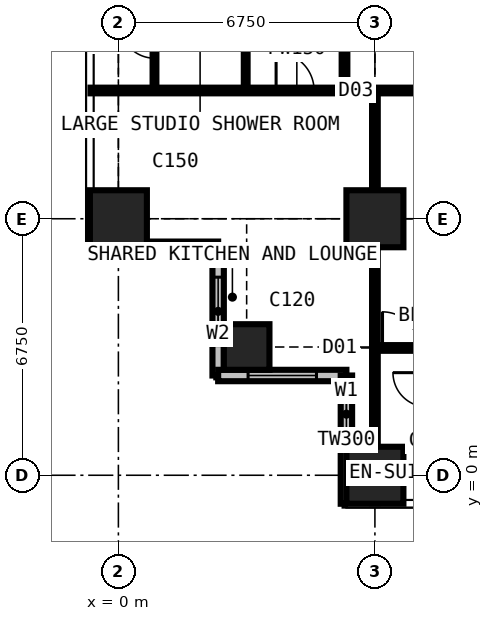
"""IFC4 building model, lengths in metres.
Left out: names, types, materials, properties, quantities, classifications, styles, units other than length and angle.
Written with IfcOpenShell. Run it as: python <this file> out.ifc"""

import sys

from ifc_helpers import new_model, si_unit, direction, frame, frame_2d, origin, origin_2d, place, context, subcontext, project, spatial, rectangle, extrude, element, fill, save


model = new_model("IFC4")
c1 = context("Model", 3, precision=1e-05, world=origin(), true_north=direction((0.0, 1.0)))
c2 = subcontext(c1, "Body", "Model", "MODEL_VIEW")
j1 = project(units=[si_unit("LENGTHUNIT", "METRE"), si_unit("PLANEANGLEUNIT", "RADIAN")], contexts=[c1])
p1 = place(None, origin())
s1 = spatial("IfcSite", under=j1, at=p1, CompositionType="ELEMENT")
p2 = place(p1, origin())
s2 = spatial("IfcBuilding", under=s1, at=p2, CompositionType="ELEMENT")
p3 = place(p2, frame((0.0, 0.0, 153.0)))
s3 = spatial("IfcBuildingStorey", under=s2, at=p3, CompositionType="ELEMENT", Elevation=153.0)
p4 = place(p3, frame((0.0, 6.75, 0.0), z_axis=(0.0, 0.0, 1.0), x_axis=(1.0, 0.0, 0.0)))
e1 = element("IfcColumn", 1, at=p4, inside=s3, PredefinedType="COLUMN", context=c2, shape_type="SweptSolid", body=[
    extrude(rectangle(XDim=1.5, YDim=1.5, at=origin_2d()), origin(), (0.0, 0.0, 1.0), 3.6),
])
p5 = place(p3, frame((3.375, 3.375, 0.0), z_axis=(0.0, 0.0, 1.0), x_axis=(1.0, 0.0, 0.0)))
e2 = element("IfcColumn", 2, at=p5, inside=s3, PredefinedType="COLUMN", context=c2, shape_type="SweptSolid", body=[
    extrude(rectangle(XDim=1.2, YDim=1.2, at=origin_2d()), origin(), (0.0, 0.0, 1.0), 3.6),
])
for number, where, z_axis, x_axis in (
    (3, (6.75, 0.0, 0.0), (0.0, 0.0, 1.0), (1.0, 0.0, 0.0)),
    (4, (6.75, 6.75, 0.0), (0.0, 0.0, 1.0), (1.0, 0.0, 0.0)),
):
    element("IfcColumn", number, at=place(p3, frame(where, z_axis=z_axis, x_axis=x_axis)), inside=s3, PredefinedType="COLUMN", context=c2, shape_type="SweptSolid", body=[
        extrude(rectangle(XDim=1.5, YDim=1.5, at=origin_2d()), origin(), (0.0, 0.0, 1.0), 3.6),
    ])
p6 = place(p3, frame((-0.75, 6.0, 0.0), z_axis=(0.0, 0.0, 1.0), x_axis=(1.0, 0.0, 0.0)))
e5 = element("IfcWall", 5, at=p6, inside=s3, PredefinedType="SOLIDWALL", context=c2, shape_type="SweptSolid", body=[
    extrude(rectangle(XDim=3.375, YDim=0.3, at=frame_2d((1.688, 0.0))), origin(), (0.0, 0.0, 1.0), 3.375),
])
p7 = place(p6, frame((1.607, 0.0, 0.9)))
e6 = element("IfcOpeningElement", 6, at=p7, cuts=e5, PredefinedType="OPENING", context=c2, shape_type="SweptSolid", body=[
    extrude(rectangle(XDim=1.5, YDim=1.8, at=frame_2d((0.75, 0.9))), frame((0.0, 0.16, 0.0), z_axis=(0.0, -1.0, 0.0), x_axis=(1.0, 0.0, 0.0)), (0.0, 0.0, 1.0), 0.32),
])
p8 = place(p3, frame((2.625, 6.0, 0.0), z_axis=(0.0, 0.0, 1.0), x_axis=(0.0, -1.0, 0.0)))
e7 = element("IfcWall", 7, at=p8, inside=s3, PredefinedType="SOLIDWALL", context=c2, shape_type="SweptSolid", body=[
    extrude(rectangle(XDim=3.375, YDim=0.3, at=frame_2d((1.688, 0.0))), origin(), (0.0, 0.0, 1.0), 3.375),
])
p9 = place(p8, frame((0.788, 0.0, 0.6)))
e8 = element("IfcOpeningElement", 8, at=p9, cuts=e7, PredefinedType="OPENING", context=c2, shape_type="SweptSolid", body=[
    extrude(rectangle(XDim=1.8, YDim=2.1, at=frame_2d((0.9, 1.05))), frame((0.0, 0.16, 0.0), z_axis=(0.0, -1.0, 0.0), x_axis=(1.0, 0.0, 0.0)), (0.0, 0.0, 1.0), 0.32),
])
p10 = place(p3, frame((2.625, 2.625, 0.0), z_axis=(0.0, 0.0, 1.0), x_axis=(1.0, 0.0, 0.0)))
e9 = element("IfcWall", 9, at=p10, inside=s3, PredefinedType="SOLIDWALL", context=c2, shape_type="SweptSolid", body=[
    extrude(rectangle(XDim=3.375, YDim=0.3, at=frame_2d((1.688, 0.0))), origin(), (0.0, 0.0, 1.0), 3.375),
])
p11 = place(p10, frame((0.788, 0.0, 0.6)))
e10 = element("IfcOpeningElement", 10, at=p11, cuts=e9, PredefinedType="OPENING", context=c2, shape_type="SweptSolid", body=[
    extrude(rectangle(XDim=1.8, YDim=2.1, at=frame_2d((0.9, 1.05))), frame((0.0, 0.16, 0.0), z_axis=(0.0, -1.0, 0.0), x_axis=(1.0, 0.0, 0.0)), (0.0, 0.0, 1.0), 0.32),
])
p12 = place(p3, frame((6.0, 2.625, 0.0), z_axis=(0.0, 0.0, 1.0), x_axis=(0.0, -1.0, 0.0)))
e11 = element("IfcWall", 11, at=p12, inside=s3, PredefinedType="SOLIDWALL", context=c2, shape_type="SweptSolid", body=[
    extrude(rectangle(XDim=3.375, YDim=0.3, at=frame_2d((1.688, 0.0))), origin(), (0.0, 0.0, 1.0), 3.375),
])
p13 = place(p12, frame((0.268, 0.0, 0.9)))
e12 = element("IfcOpeningElement", 12, at=p13, cuts=e11, PredefinedType="OPENING", context=c2, shape_type="SweptSolid", body=[
    extrude(rectangle(XDim=1.5, YDim=1.8, at=frame_2d((0.75, 0.9))), frame((0.0, 0.16, 0.0), z_axis=(0.0, -1.0, 0.0), x_axis=(1.0, 0.0, 0.0)), (0.0, 0.0, 1.0), 0.32),
])
p14 = place(p3, frame((-0.734, 10.125, 0.0), z_axis=(0.0, 0.0, 1.0), x_axis=(1.0, 0.0, 0.0)))
e13 = element("IfcWall", 13, at=p14, inside=s3, PredefinedType="PARTITIONING", context=c2, shape_type="SweptSolid", body=[
    extrude(rectangle(XDim=10.859, YDim=0.15, at=frame_2d((5.429, 0.0))), origin(), (0.0, 0.0, 1.0), 3.375),
])
p15 = place(p14, frame((4.884, 0.0, 0.0)))
e14 = element("IfcOpeningElement", 14, at=p15, cuts=e13, PredefinedType="OPENING", context=c2, shape_type="SweptSolid", body=[
    extrude(rectangle(XDim=1.0, YDim=2.2, at=frame_2d((0.5, 1.1))), frame((0.0, 0.085, 0.0), z_axis=(0.0, -1.0, 0.0), x_axis=(1.0, 0.0, 0.0)), (0.0, 0.0, 1.0), 0.17),
])
p16 = place(p3, frame((0.95, 10.125, 0.0), z_axis=(0.0, 0.0, 1.0), x_axis=(0.0, 1.0, 0.0)))
e15 = element("IfcWall", 15, at=p16, inside=s3, PredefinedType="PARTITIONING", context=c2, shape_type="SweptSolid", body=[
    extrude(rectangle(XDim=2.6, YDim=0.1, at=frame_2d((1.3, 0.0))), origin(), (0.0, 0.0, 1.0), 3.375),
])
p17 = place(p16, frame((0.85, 0.0, 0.0)))
e16 = element("IfcOpeningElement", 16, at=p17, cuts=e15, PredefinedType="OPENING", context=c2, shape_type="SweptSolid", body=[
    extrude(rectangle(XDim=0.9, YDim=2.2, at=frame_2d((0.45, 1.1))), frame((0.0, 0.06, 0.0), z_axis=(0.0, -1.0, 0.0), x_axis=(1.0, 0.0, 0.0)), (0.0, 0.0, 1.0), 0.12),
])
p18 = place(p3, frame((3.35, 10.125, 0.0), z_axis=(0.0, 0.0, 1.0), x_axis=(0.0, 1.0, 0.0)))
e17 = element("IfcWall", 17, at=p18, inside=s3, PredefinedType="PARTITIONING", context=c2, shape_type="SweptSolid", body=[
    extrude(rectangle(XDim=16.875, YDim=0.1, at=frame_2d((8.438, 0.0))), origin(), (0.0, 0.0, 1.0), 3.375),
])
p19 = place(p18, frame((13.7, 0.0, 0.0)))
e18 = element("IfcOpeningElement", 18, at=p19, cuts=e17, PredefinedType="OPENING", context=c2, shape_type="SweptSolid", body=[
    extrude(rectangle(XDim=0.95, YDim=2.2, at=frame_2d((0.475, 1.1))), frame((0.0, 0.06, 0.0), z_axis=(0.0, -1.0, 0.0), x_axis=(1.0, 0.0, 0.0)), (0.0, 0.0, 1.0), 0.12),
])
p20 = place(p18, frame((4.2, 0.0, 0.0)))
e19 = element("IfcOpeningElement", 19, at=p20, cuts=e17, PredefinedType="OPENING", context=c2, shape_type="SweptSolid", body=[
    extrude(rectangle(XDim=0.95, YDim=2.2, at=frame_2d((0.475, 1.1))), frame((0.0, 0.06, 0.0), z_axis=(0.0, -1.0, 0.0), x_axis=(1.0, 0.0, 0.0)), (0.0, 0.0, 1.0), 0.12),
])
p21 = place(p18, frame((10.95, 0.0, 0.0)))
e20 = element("IfcOpeningElement", 20, at=p21, cuts=e17, PredefinedType="OPENING", context=c2, shape_type="SweptSolid", body=[
    extrude(rectangle(XDim=0.95, YDim=2.2, at=frame_2d((0.475, 1.1))), frame((0.0, 0.06, 0.0), z_axis=(0.0, -1.0, 0.0), x_axis=(1.0, 0.0, 0.0)), (0.0, 0.0, 1.0), 0.12),
])
p22 = place(p3, frame((5.95, 10.125, 0.0), z_axis=(0.0, 0.0, 1.0), x_axis=(0.0, 1.0, 0.0)))
e21 = element("IfcWall", 21, at=p22, inside=s3, PredefinedType="PARTITIONING", context=c2, shape_type="SweptSolid", body=[
    extrude(rectangle(XDim=2.65, YDim=0.15, at=frame_2d((1.325, 0.0))), origin(), (0.0, 0.0, 1.0), 3.375),
])
p23 = place(p3, frame((6.75, -0.734, 0.0), z_axis=(0.0, 0.0, 1.0), x_axis=(0.0, 1.0, 0.0)))
e22 = element("IfcWall", 22, at=p23, inside=s3, PredefinedType="PARTITIONING", context=c2, shape_type="SweptSolid", body=[
    extrude(rectangle(XDim=10.859, YDim=0.15, at=frame_2d((5.429, 0.0))), origin(), (0.0, 0.0, 1.0), 2.877),
])
p24 = place(p3, frame((6.75, 3.35, 0.0), z_axis=(0.0, 0.0, 1.0), x_axis=(1.0, 0.0, 0.0)))
e23 = element("IfcWall", 23, at=p24, inside=s3, PredefinedType="PARTITIONING", context=c2, shape_type="SweptSolid", body=[
    extrude(rectangle(XDim=20.25, YDim=0.15, at=frame_2d((10.125, 0.0))), origin(), (0.0, 0.0, 1.0), 3.375),
])
p25 = place(p24, frame((0.2, 0.0, 0.0)))
e24 = element("IfcOpeningElement", 24, at=p25, cuts=e23, PredefinedType="OPENING", context=c2, shape_type="SweptSolid", body=[
    extrude(rectangle(XDim=0.95, YDim=2.2, at=frame_2d((0.475, 1.1))), frame((0.0, 0.085, 0.0), z_axis=(0.0, -1.0, 0.0), x_axis=(1.0, 0.0, 0.0)), (0.0, 0.0, 1.0), 0.17),
])
p26 = place(p24, frame((3.575, 0.0, 0.0)))
e25 = element("IfcOpeningElement", 25, at=p26, cuts=e23, PredefinedType="OPENING", context=c2, shape_type="SweptSolid", body=[
    extrude(rectangle(XDim=0.95, YDim=2.2, at=frame_2d((0.475, 1.1))), frame((0.0, 0.085, 0.0), z_axis=(0.0, -1.0, 0.0), x_axis=(1.0, 0.0, 0.0)), (0.0, 0.0, 1.0), 0.17),
])
p27 = place(p24, frame((6.95, 0.0, 0.0)))
e26 = element("IfcOpeningElement", 26, at=p27, cuts=e23, PredefinedType="OPENING", context=c2, shape_type="SweptSolid", body=[
    extrude(rectangle(XDim=0.95, YDim=2.2, at=frame_2d((0.475, 1.1))), frame((0.0, 0.085, 0.0), z_axis=(0.0, -1.0, 0.0), x_axis=(1.0, 0.0, 0.0)), (0.0, 0.0, 1.0), 0.17),
])
p28 = place(p24, frame((15.1, 0.0, 0.0)))
e27 = element("IfcOpeningElement", 27, at=p28, cuts=e23, PredefinedType="OPENING", context=c2, shape_type="SweptSolid", body=[
    extrude(rectangle(XDim=0.95, YDim=2.2, at=frame_2d((0.475, 1.1))), frame((0.0, 0.085, 0.0), z_axis=(0.0, -1.0, 0.0), x_axis=(1.0, 0.0, 0.0)), (0.0, 0.0, 1.0), 0.17),
])
p29 = place(p24, frame((10.325, 0.0, 0.0)))
e28 = element("IfcOpeningElement", 28, at=p29, cuts=e23, PredefinedType="OPENING", context=c2, shape_type="SweptSolid", body=[
    extrude(rectangle(XDim=0.95, YDim=2.2, at=frame_2d((0.475, 1.1))), frame((0.0, 0.085, 0.0), z_axis=(0.0, -1.0, 0.0), x_axis=(1.0, 0.0, 0.0)), (0.0, 0.0, 1.0), 0.17),
])
p30 = place(p7, origin())
e29 = element("IfcWindow", 29, at=p30, inside=s3, PartitioningType="SINGLE_PANEL", PredefinedType="WINDOW", context=c2, shape_type="SweptSolid", body=[
    extrude(rectangle(XDim=1.5, YDim=1.8, at=frame_2d((0.75, 0.9))), frame((0.0, 0.03, 0.0), z_axis=(0.0, -1.0, 0.0), x_axis=(1.0, 0.0, 0.0)), (0.0, 0.0, 1.0), 0.06),
])
fill(e6, e29)
p31 = place(p9, origin())
e30 = element("IfcWindow", 30, at=p31, inside=s3, PartitioningType="SINGLE_PANEL", PredefinedType="WINDOW", context=c2, shape_type="SweptSolid", body=[
    extrude(rectangle(XDim=1.8, YDim=2.1, at=frame_2d((0.9, 1.05))), frame((0.0, 0.03, 0.0), z_axis=(0.0, -1.0, 0.0), x_axis=(1.0, 0.0, 0.0)), (0.0, 0.0, 1.0), 0.06),
])
fill(e8, e30)
p32 = place(p11, origin())
e31 = element("IfcWindow", 31, at=p32, inside=s3, PartitioningType="SINGLE_PANEL", PredefinedType="WINDOW", context=c2, shape_type="SweptSolid", body=[
    extrude(rectangle(XDim=1.8, YDim=2.1, at=frame_2d((0.9, 1.05))), frame((0.0, 0.03, 0.0), z_axis=(0.0, -1.0, 0.0), x_axis=(1.0, 0.0, 0.0)), (0.0, 0.0, 1.0), 0.06),
])
fill(e10, e31)
p33 = place(p13, origin())
e32 = element("IfcWindow", 32, at=p33, inside=s3, PartitioningType="SINGLE_PANEL", PredefinedType="WINDOW", context=c2, shape_type="SweptSolid", body=[
    extrude(rectangle(XDim=1.5, YDim=1.8, at=frame_2d((0.75, 0.9))), frame((0.0, 0.03, 0.0), z_axis=(0.0, -1.0, 0.0), x_axis=(1.0, 0.0, 0.0)), (0.0, 0.0, 1.0), 0.06),
])
fill(e12, e32)
p34 = place(p15, origin())
e33 = element("IfcDoor", 33, at=p34, inside=s3, OperationType="SINGLE_SWING_LEFT", PredefinedType="DOOR", context=c2, shape_type="SweptSolid", body=[
    extrude(rectangle(XDim=1.0, YDim=2.2, at=frame_2d((0.5, 1.1))), frame((0.0, 0.025, 0.0), z_axis=(0.0, -1.0, 0.0), x_axis=(1.0, 0.0, 0.0)), (0.0, 0.0, 1.0), 0.05),
])
fill(e14, e33)
p35 = place(p25, origin())
e34 = element("IfcDoor", 34, at=p35, inside=s3, OperationType="SINGLE_SWING_LEFT", PredefinedType="DOOR", context=c2, shape_type="SweptSolid", body=[
    extrude(rectangle(XDim=0.95, YDim=2.2, at=frame_2d((0.475, 1.1))), frame((0.0, 0.025, 0.0), z_axis=(0.0, -1.0, 0.0), x_axis=(1.0, 0.0, 0.0)), (0.0, 0.0, 1.0), 0.05),
])
fill(e24, e34)
p36 = place(p17, origin())
e35 = element("IfcDoor", 35, at=p36, inside=s3, OperationType="SINGLE_SWING_RIGHT", PredefinedType="DOOR", context=c2, shape_type="SweptSolid", body=[
    extrude(rectangle(XDim=0.9, YDim=2.2, at=frame_2d((0.45, 1.1))), frame((0.0, 0.025, 0.0), z_axis=(0.0, -1.0, 0.0), x_axis=(1.0, 0.0, 0.0)), (0.0, 0.0, 1.0), 0.05),
])
fill(e16, e35)
save(model, sys.argv[1])
